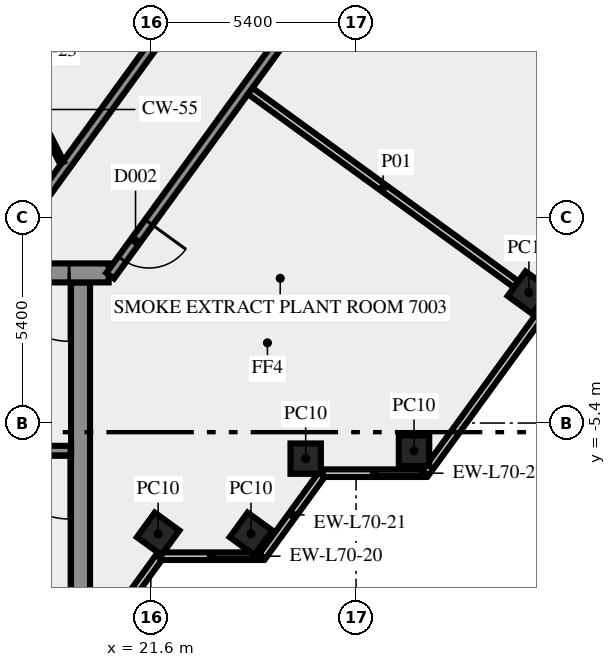
"""IFC4 building model, lengths in metres.
Left out: names, types, materials, properties, quantities, classifications, styles, units other than length and angle.
Written with IfcOpenShell. Run it as: python <this file> out.ifc"""

import sys

from ifc_helpers import new_model, si_unit, direction, frame, frame_2d, origin, origin_2d, place, context, subcontext, project, spatial, rectangle, extrude, element, fill, save


model = new_model("IFC4")
c1 = context("Model", 3, precision=1e-05, world=origin(), true_north=direction((0.0, 1.0)))
c2 = subcontext(c1, "Body", "Model", "MODEL_VIEW")
j1 = project(units=[si_unit("LENGTHUNIT", "METRE"), si_unit("PLANEANGLEUNIT", "RADIAN")], contexts=[c1])
p1 = place(None, origin())
s1 = spatial("IfcSite", under=j1, at=p1, CompositionType="ELEMENT")
p2 = place(p1, origin())
s2 = spatial("IfcBuilding", under=s1, at=p2, CompositionType="ELEMENT")
p3 = place(p2, frame((0.0, 0.0, 301.0)))
s3 = spatial("IfcBuildingStorey", under=s2, at=p3, CompositionType="ELEMENT", Elevation=301.0)
for number, where, z_axis, x_axis in (
    (1, (21.792, -8.315, 0.0), (0.0, 0.0, 1.0), (0.588, 0.809, 0.0)),
    (2, (24.235, -8.315, 0.0), (0.0, 0.0, 1.0), (0.588, 0.809, 0.0)),
    (3, (25.674, -6.337, 0.0), (0.0, 0.0, 1.0), (1.0, 0.0, 0.0)),
    (4, (28.525, -6.13, 0.0), (0.0, 0.0, 1.0), (1.0, 0.0, 0.0)),
    (5, (31.548, -1.969, 0.0), (0.0, 0.0, 1.0), (0.588, 0.809, 0.0)),
):
    element("IfcColumn", number, at=place(p3, frame(where, z_axis=z_axis, x_axis=x_axis)), inside=s3, PredefinedType="COLUMN", context=c2, shape_type="SweptSolid", body=[
        extrude(rectangle(XDim=0.8, YDim=0.8, at=origin_2d()), origin(), (0.0, 0.0, 1.0), 5.65),
    ])
p4 = place(p3, frame((20.253, -11.083, 0.0), z_axis=(0.0, 0.0, 1.0), x_axis=(0.587766567315, 0.809030569476, 0.0)))
e6 = element("IfcWall", 6, at=p4, inside=s3, PredefinedType="SOLIDWALL", context=c2, shape_type="SweptSolid", body=[
    extrude(rectangle(XDim=2.688, YDim=0.2, at=frame_2d((1.344, 0.0))), origin(), (0.0, 0.0, 1.0), 5.65),
])
p5 = place(p3, frame((21.843, -8.904, 0.0), z_axis=(0.0, 0.0, 1.0), x_axis=(1.0, 0.0, 0.0)))
e7 = element("IfcWall", 7, at=p5, inside=s3, PredefinedType="SOLIDWALL", context=c2, shape_type="SweptSolid", body=[
    extrude(rectangle(XDim=2.7, YDim=0.2, at=frame_2d((1.35, 0.0))), origin(), (0.0, 0.0, 1.0), 5.65),
])
p6 = place(p3, frame((24.533, -8.909, 0.0), z_axis=(0.0, 0.0, 1.0), x_axis=(0.587720002413, 0.809064397168, 0.0)))
e8 = element("IfcWall", 8, at=p6, inside=s3, PredefinedType="SOLIDWALL", context=c2, shape_type="SweptSolid", body=[
    extrude(rectangle(XDim=2.7, YDim=0.2, at=frame_2d((1.35, 0.0))), origin(), (0.0, 0.0, 1.0), 5.65),
])
p7 = place(p3, frame((26.13, -6.719, 0.0), z_axis=(0.0, 0.0, 1.0), x_axis=(1.0, 0.0, 0.0)))
e9 = element("IfcWall", 9, at=p7, inside=s3, PredefinedType="SOLIDWALL", context=c2, shape_type="SweptSolid", body=[
    extrude(rectangle(XDim=2.7, YDim=0.2, at=frame_2d((1.35, 0.0))), origin(), (0.0, 0.0, 1.0), 5.65),
])
p8 = place(p3, frame((28.82, -6.724, 0.0), z_axis=(0.0, 0.0, 1.0), x_axis=(0.587789790223, 0.809013697356, 0.0)))
e10 = element("IfcWall", 10, at=p8, inside=s3, PredefinedType="SOLIDWALL", context=c2, shape_type="SweptSolid", body=[
    extrude(rectangle(XDim=16.956, YDim=0.2, at=frame_2d((8.478, 0.0))), origin(), (0.0, 0.0, 1.0), 5.65),
])
p9 = place(p3, frame((19.75, -10.5, 0.0), z_axis=(0.0, 0.0, 1.0), x_axis=(0.0, 1.0, 0.0)))
e11 = element("IfcWall", 11, at=p9, inside=s3, PredefinedType="SHEAR", context=c2, shape_type="SweptSolid", body=[
    extrude(rectangle(XDim=8.8, YDim=0.5, at=frame_2d((4.4, 0.0))), origin(), (0.0, 0.0, 1.0), 5.65),
])
p10 = place(p3, frame((19.5, -6.125, 0.0), z_axis=(0.0, 0.0, 1.0), x_axis=(-1.0, 0.0, 0.0)))
e12 = element("IfcWall", 12, at=p10, inside=s3, PredefinedType="SHEAR", context=c2, shape_type="SweptSolid", body=[
    extrude(rectangle(XDim=8.05, YDim=0.25, at=frame_2d((4.025, 0.0))), origin(), (0.0, 0.0, 1.0), 5.65),
])
p11 = place(p10, frame((0.05, 0.0, 0.0)))
e13 = element("IfcOpeningElement", 13, at=p11, cuts=e12, PredefinedType="OPENING", context=c2, shape_type="SweptSolid", body=[
    extrude(rectangle(XDim=1.8, YDim=2.1, at=frame_2d((0.9, 1.05))), frame((0.0, 0.135, 0.0), z_axis=(0.0, -1.0, 0.0), x_axis=(1.0, 0.0, 0.0)), (0.0, 0.0, 1.0), 0.27),
])
p12 = place(p3, frame((20.49, -1.45, 0.0), z_axis=(0.0, 0.0, 1.0), x_axis=(-1.0, 0.0, 0.0)))
e14 = element("IfcWall", 14, at=p12, inside=s3, PredefinedType="SHEAR", context=c2, shape_type="SweptSolid", body=[
    extrude(rectangle(XDim=40.98, YDim=0.5, at=frame_2d((20.49, 0.0))), origin(), (0.0, 0.0, 1.0), 5.65),
])
p13 = place(p12, frame((38.14, 0.0, 0.0)))
e15 = element("IfcOpeningElement", 15, at=p13, cuts=e14, PredefinedType="OPENING", context=c2, shape_type="SweptSolid", body=[
    extrude(rectangle(XDim=1.8, YDim=2.1, at=frame_2d((0.9, 1.05))), frame((0.0, 0.26, 0.0), z_axis=(0.0, -1.0, 0.0), x_axis=(1.0, 0.0, 0.0)), (0.0, 0.0, 1.0), 0.52),
])
p14 = place(p12, frame((35.89, 0.0, 0.0)))
e16 = element("IfcOpeningElement", 16, at=p14, cuts=e14, PredefinedType="OPENING", context=c2, shape_type="SweptSolid", body=[
    extrude(rectangle(XDim=0.9, YDim=2.1, at=frame_2d((0.45, 1.05))), frame((0.0, 0.26, 0.0), z_axis=(0.0, -1.0, 0.0), x_axis=(1.0, 0.0, 0.0)), (0.0, 0.0, 1.0), 0.52),
])
p15 = place(p12, frame((32.94, 0.0, 0.0)))
e17 = element("IfcOpeningElement", 17, at=p15, cuts=e14, PredefinedType="OPENING", context=c2, shape_type="SweptSolid", body=[
    extrude(rectangle(XDim=0.9, YDim=2.1, at=frame_2d((0.45, 1.05))), frame((0.0, 0.26, 0.0), z_axis=(0.0, -1.0, 0.0), x_axis=(1.0, 0.0, 0.0)), (0.0, 0.0, 1.0), 0.52),
])
p16 = place(p12, frame((21.765, 0.0, 0.0)))
e18 = element("IfcOpeningElement", 18, at=p16, cuts=e14, PredefinedType="OPENING", context=c2, shape_type="SweptSolid", body=[
    extrude(rectangle(XDim=2.0, YDim=2.1, at=frame_2d((1.0, 1.05))), frame((0.0, 0.26, 0.0), z_axis=(0.0, -1.0, 0.0), x_axis=(1.0, 0.0, 0.0)), (0.0, 0.0, 1.0), 0.52),
])
p17 = place(p12, frame((14.903, 0.0, 0.0)))
e19 = element("IfcOpeningElement", 19, at=p17, cuts=e14, PredefinedType="OPENING", context=c2, shape_type="SweptSolid", body=[
    extrude(rectangle(XDim=0.9, YDim=2.1, at=frame_2d((0.45, 1.05))), frame((0.0, 0.26, 0.0), z_axis=(0.0, -1.0, 0.0), x_axis=(1.0, 0.0, 0.0)), (0.0, 0.0, 1.0), 0.52),
])
p18 = place(p12, frame((12.54, 0.0, 0.0)))
e20 = element("IfcOpeningElement", 20, at=p18, cuts=e14, PredefinedType="OPENING", context=c2, shape_type="SweptSolid", body=[
    extrude(rectangle(XDim=0.9, YDim=2.1, at=frame_2d((0.45, 1.05))), frame((0.0, 0.26, 0.0), z_axis=(0.0, -1.0, 0.0), x_axis=(1.0, 0.0, 0.0)), (0.0, 0.0, 1.0), 0.52),
])
p19 = place(p12, frame((9.877, 0.0, 0.0)))
e21 = element("IfcOpeningElement", 21, at=p19, cuts=e14, PredefinedType="OPENING", context=c2, shape_type="SweptSolid", body=[
    extrude(rectangle(XDim=0.9, YDim=2.1, at=frame_2d((0.45, 1.05))), frame((0.0, 0.26, 0.0), z_axis=(0.0, -1.0, 0.0), x_axis=(1.0, 0.0, 0.0)), (0.0, 0.0, 1.0), 0.52),
])
p20 = place(p12, frame((7.14, 0.0, 0.0)))
e22 = element("IfcOpeningElement", 22, at=p20, cuts=e14, PredefinedType="OPENING", context=c2, shape_type="SweptSolid", body=[
    extrude(rectangle(XDim=0.9, YDim=2.1, at=frame_2d((0.45, 1.05))), frame((0.0, 0.26, 0.0), z_axis=(0.0, -1.0, 0.0), x_axis=(1.0, 0.0, 0.0)), (0.0, 0.0, 1.0), 0.52),
])
p21 = place(p12, frame((5.028, 0.0, 0.0)))
e23 = element("IfcOpeningElement", 23, at=p21, cuts=e14, PredefinedType="OPENING", context=c2, shape_type="SweptSolid", body=[
    extrude(rectangle(XDim=0.8, YDim=2.1, at=frame_2d((0.4, 1.05))), frame((0.0, 0.26, 0.0), z_axis=(0.0, -1.0, 0.0), x_axis=(1.0, 0.0, 0.0)), (0.0, 0.0, 1.0), 0.52),
])
p22 = place(p12, frame((3.452, 0.0, 0.0)))
e24 = element("IfcOpeningElement", 24, at=p22, cuts=e14, PredefinedType="OPENING", context=c2, shape_type="SweptSolid", body=[
    extrude(rectangle(XDim=0.8, YDim=2.1, at=frame_2d((0.4, 1.05))), frame((0.0, 0.26, 0.0), z_axis=(0.0, -1.0, 0.0), x_axis=(1.0, 0.0, 0.0)), (0.0, 0.0, 1.0), 0.52),
])
p23 = place(p12, frame((1.04, 0.0, 0.0)))
e25 = element("IfcOpeningElement", 25, at=p23, cuts=e14, PredefinedType="OPENING", context=c2, shape_type="SweptSolid", body=[
    extrude(rectangle(XDim=1.8, YDim=2.1, at=frame_2d((0.9, 1.05))), frame((0.0, 0.26, 0.0), z_axis=(0.0, -1.0, 0.0), x_axis=(1.0, 0.0, 0.0)), (0.0, 0.0, 1.0), 0.52),
])
p24 = place(p3, frame((17.545, -1.125, 0.0), z_axis=(0.0, 0.0, 1.0), x_axis=(0.587789755823, 0.80901372235, 0.0)))
e26 = element("IfcWall", 26, at=p24, inside=s3, PredefinedType="SOLIDWALL", context=c2, shape_type="SweptSolid", body=[
    extrude(rectangle(XDim=23.645, YDim=0.25, at=frame_2d((11.822, 0.0))), origin(), (0.0, 0.0, 1.0), 5.65),
])
p25 = place(p24, frame((21.303, 0.0, 0.0)))
e27 = element("IfcOpeningElement", 27, at=p25, cuts=e26, PredefinedType="OPENING", context=c2, shape_type="SweptSolid", body=[
    extrude(rectangle(XDim=1.2, YDim=2.1, at=frame_2d((0.6, 1.05))), frame((0.0, 0.135, 0.0), z_axis=(0.0, -1.0, 0.0), x_axis=(1.0, 0.0, 0.0)), (0.0, 0.0, 1.0), 0.27),
])
p26 = place(p3, frame((33.531, 16.369, 0.0), z_axis=(0.0, 0.0, 1.0), x_axis=(-0.587781095509, -0.809020014438, 0.0)))
e28 = element("IfcWall", 28, at=p26, inside=s3, PredefinedType="SOLIDWALL", context=c2, shape_type="SweptSolid", body=[
    extrude(rectangle(XDim=22.117, YDim=0.25, at=frame_2d((11.058, 0.0))), origin(), (0.0, 0.0, 1.0), 5.65),
])
p27 = place(p26, frame((20.384, 0.0, 0.0)))
e29 = element("IfcOpeningElement", 29, at=p27, cuts=e28, PredefinedType="OPENING", context=c2, shape_type="SweptSolid", body=[
    extrude(rectangle(XDim=1.2, YDim=2.1, at=frame_2d((0.6, 1.05))), frame((0.0, 0.135, 0.0), z_axis=(0.0, -1.0, 0.0), x_axis=(1.0, 0.0, 0.0)), (0.0, 0.0, 1.0), 0.27),
])
p28 = place(p26, frame((1.046, 0.0, 0.0)))
e30 = element("IfcOpeningElement", 30, at=p28, cuts=e28, PredefinedType="OPENING", context=c2, shape_type="SweptSolid", body=[
    extrude(rectangle(XDim=1.2, YDim=2.1, at=frame_2d((0.6, 1.05))), frame((0.0, 0.135, 0.0), z_axis=(0.0, -1.0, 0.0), x_axis=(1.0, 0.0, 0.0)), (0.0, 0.0, 1.0), 0.27),
])
p29 = place(p3, frame((31.209, -1.747, 0.0), z_axis=(0.0, 0.0, 1.0), x_axis=(-0.80898392027, 0.587830772199, 0.0)))
e31 = element("IfcWall", 31, at=p29, inside=s3, PredefinedType="SOLIDWALL", context=c2, shape_type="SweptSolid", body=[
    extrude(rectangle(XDim=8.645, YDim=0.2, at=frame_2d((4.323, 0.0))), origin(), (0.0, 0.0, 1.0), 5.65),
])
p30 = place(p3, frame((18.0, 3.925, 0.0), z_axis=(0.0, 0.0, 1.0), x_axis=(0.453950796792, -0.891026752736, 0.0)))
e32 = element("IfcWall", 32, at=p30, inside=s3, PredefinedType="PARTITIONING", context=c2, shape_type="SweptSolid", body=[
    extrude(rectangle(XDim=2.778, YDim=0.12, at=frame_2d((1.389, 0.0))), origin(), (0.0, 0.0, 1.0), 5.65),
])
p31 = place(p11, origin())
e33 = element("IfcDoor", 33, at=p31, inside=s3, OperationType="DOUBLE_DOOR_SINGLE_SWING", PredefinedType="DOOR", context=c2, shape_type="SweptSolid", body=[
    extrude(rectangle(XDim=1.8, YDim=2.1, at=frame_2d((0.9, 1.05))), frame((0.0, 0.025, 0.0), z_axis=(0.0, -1.0, 0.0), x_axis=(1.0, 0.0, 0.0)), (0.0, 0.0, 1.0), 0.05),
])
fill(e13, e33)
p32 = place(p23, origin())
e34 = element("IfcDoor", 34, at=p32, inside=s3, OperationType="DOUBLE_DOOR_SINGLE_SWING", PredefinedType="DOOR", context=c2, shape_type="SweptSolid", body=[
    extrude(rectangle(XDim=1.8, YDim=2.1, at=frame_2d((0.9, 1.05))), frame((0.0, 0.025, 0.0), z_axis=(0.0, -1.0, 0.0), x_axis=(1.0, 0.0, 0.0)), (0.0, 0.0, 1.0), 0.05),
])
fill(e25, e34)
p33 = place(p27, origin())
e35 = element("IfcDoor", 35, at=p33, inside=s3, OperationType="SINGLE_SWING_RIGHT", PredefinedType="DOOR", context=c2, shape_type="SweptSolid", body=[
    extrude(rectangle(XDim=1.2, YDim=2.1, at=frame_2d((0.6, 1.05))), frame((0.0, 0.025, 0.0), z_axis=(0.0, -1.0, 0.0), x_axis=(1.0, 0.0, 0.0)), (0.0, 0.0, 1.0), 0.05),
])
fill(e29, e35)
save(model, sys.argv[1])
